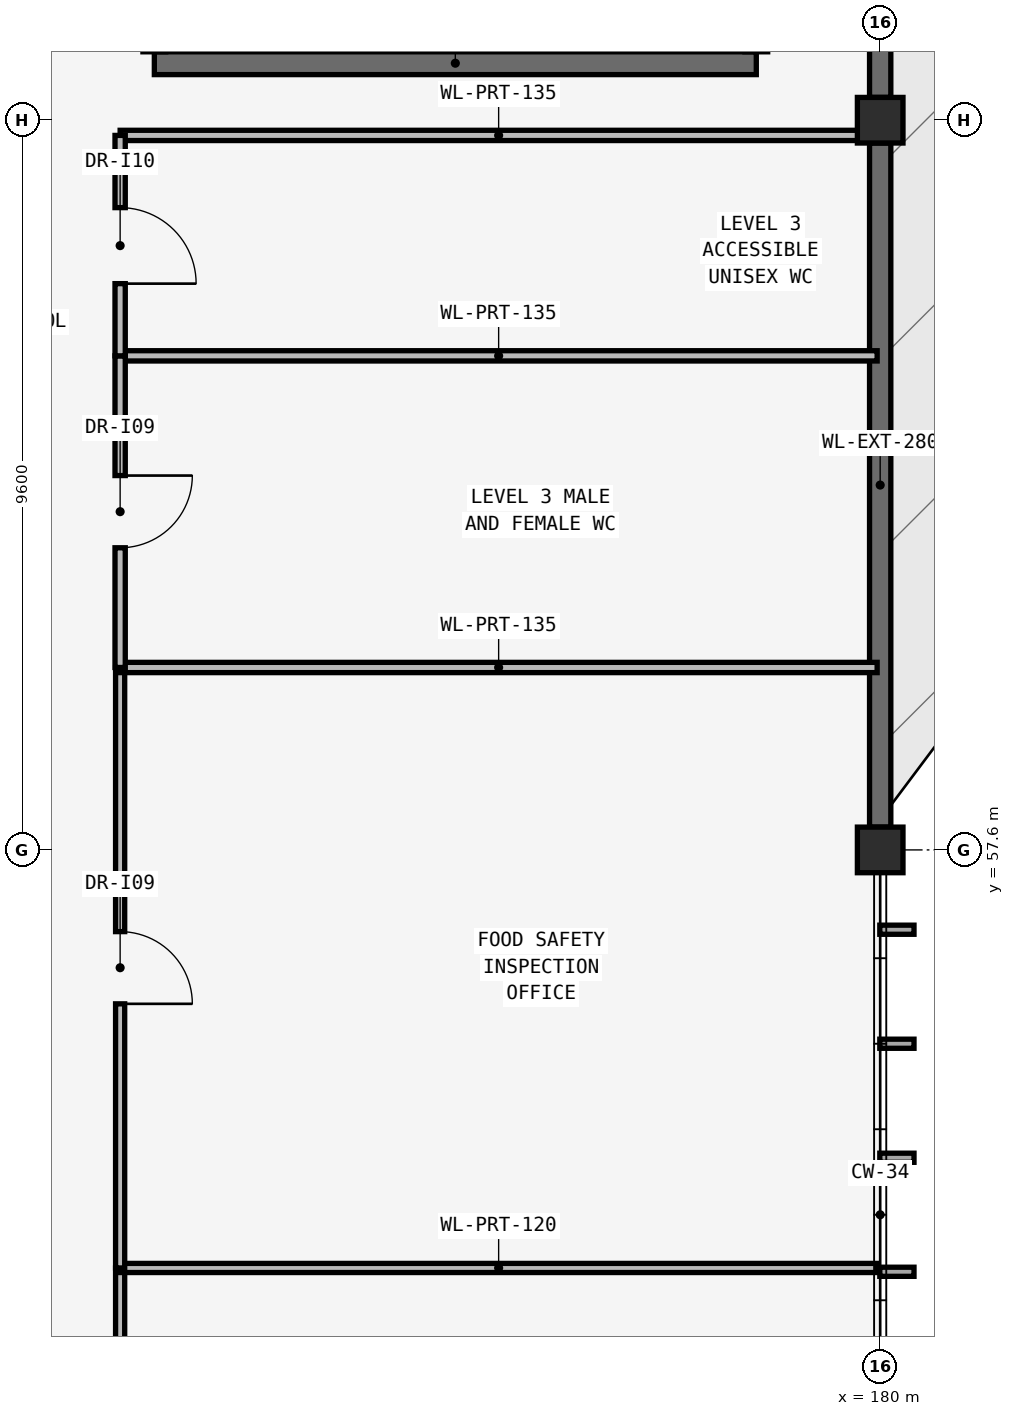
"""IFC4 building model, lengths in metres.
Left out: names, types, materials, properties, quantities, classifications, styles, units other than length and angle.
Written with IfcOpenShell. Run it as: python <this file> out.ifc"""

import sys

from ifc_helpers import new_model, si_unit, direction, frame, frame_2d, origin, origin_2d, place, context, subcontext, project, spatial, rectangle, extrude, element, fill, save


model = new_model("IFC4")
c1 = context("Model", 3, precision=1e-05, world=origin(), true_north=direction((0.0, 1.0)))
c2 = subcontext(c1, "Body", "Model", "MODEL_VIEW")
j1 = project(units=[si_unit("LENGTHUNIT", "METRE"), si_unit("PLANEANGLEUNIT", "RADIAN")], contexts=[c1])
p1 = place(None, origin())
s1 = spatial("IfcSite", under=j1, at=p1, CompositionType="ELEMENT")
p2 = place(p1, origin())
s2 = spatial("IfcBuilding", under=s1, at=p2, CompositionType="ELEMENT")
p3 = place(p2, frame((0.0, 0.0, 14.4)))
s3 = spatial("IfcBuildingStorey", under=s2, at=p3, CompositionType="ELEMENT", Elevation=14.4)
for number, where, z_axis, x_axis in (
    (1, (180.0, 57.6, 0.0), (0.0, 0.0, 1.0), (1.0, 0.0, 0.0)),
    (2, (180.0, 67.2, 0.0), (0.0, 0.0, 1.0), (1.0, 0.0, 0.0)),
):
    element("IfcColumn", number, at=place(p3, frame(where, z_axis=z_axis, x_axis=x_axis)), inside=s3, PredefinedType="COLUMN", context=c2, shape_type="SweptSolid", body=[
        extrude(rectangle(XDim=0.6, YDim=0.6, at=origin_2d()), origin(), (0.0, 0.0, 1.0), 4.2),
    ])
for number, where, z_axis, x_axis in (
    (3, (180.0, 57.9, 0.0), (0.0, 0.0, 1.0), (0.0, 1.0, 0.0)),
    (4, (180.0, 67.5, 0.0), (0.0, 0.0, 1.0), (0.0, 1.0, 0.0)),
):
    element("IfcWall", number, at=place(p3, frame(where, z_axis=z_axis, x_axis=x_axis)), inside=s3, PredefinedType="SOLIDWALL", context=c2, shape_type="SweptSolid", body=[
        extrude(rectangle(XDim=9.0, YDim=0.28, at=frame_2d((4.5, 0.0))), origin(), (0.0, 0.0, 1.0), 3.9),
    ])
p4 = place(p3, frame((170.45, 67.95, 0.0), z_axis=(0.0, 0.0, 1.0), x_axis=(1.0, 0.0, 0.0)))
e5 = element("IfcWall", 5, at=p4, inside=s3, PredefinedType="SHEAR", context=c2, shape_type="SweptSolid", body=[
    extrude(rectangle(XDim=7.92, YDim=0.3, at=frame_2d((3.96, 0.0))), origin(), (0.0, 0.0, 1.0), 3.95),
])
p5 = place(p3, frame((170.0, 38.65, 0.0), z_axis=(0.0, 0.0, 1.0), x_axis=(0.0, 1.0, 0.0)))
e6 = element("IfcWall", 6, at=p5, inside=s3, PredefinedType="PARTITIONING", context=c2, shape_type="SweptSolid", body=[
    extrude(rectangle(XDim=13.45, YDim=0.12, at=frame_2d((6.725, 0.0))), origin(), (0.0, 0.0, 1.0), 3.95),
])
p6 = place(p5, frame((6.25, 0.0, 0.0)))
e7 = element("IfcOpeningElement", 7, at=p6, cuts=e6, PredefinedType="OPENING", context=c2, shape_type="SweptSolid", body=[
    extrude(rectangle(XDim=0.95, YDim=2.1, at=frame_2d((0.475, 1.05))), frame((0.0, 0.075, 0.0), z_axis=(0.0, -1.0, 0.0), x_axis=(1.0, 0.0, 0.0)), (0.0, 0.0, 1.0), 0.15),
])
p7 = place(p3, frame((170.0, 52.1, 0.0), z_axis=(0.0, 0.0, 1.0), x_axis=(1.0, 0.0, 0.0)))
e8 = element("IfcWall", 8, at=p7, inside=s3, PredefinedType="PARTITIONING", context=c2, shape_type="SweptSolid", body=[
    extrude(rectangle(XDim=9.96, YDim=0.12, at=frame_2d((4.98, 0.0))), origin(), (0.0, 0.0, 1.0), 3.95),
])
p8 = place(p3, frame((170.0, 52.1, 0.0), z_axis=(0.0, 0.0, 1.0), x_axis=(0.0, 1.0, 0.0)))
e9 = element("IfcWall", 9, at=p8, inside=s3, PredefinedType="PARTITIONING", context=c2, shape_type="SweptSolid", body=[
    extrude(rectangle(XDim=7.9, YDim=0.12, at=frame_2d((3.95, 0.0))), origin(), (0.0, 0.0, 1.0), 3.95),
])
p9 = place(p8, frame((3.475, 0.0, 0.0)))
e10 = element("IfcOpeningElement", 10, at=p9, cuts=e9, PredefinedType="OPENING", context=c2, shape_type="SweptSolid", body=[
    extrude(rectangle(XDim=0.95, YDim=2.1, at=frame_2d((0.475, 1.05))), frame((0.0, 0.075, 0.0), z_axis=(0.0, -1.0, 0.0), x_axis=(1.0, 0.0, 0.0)), (0.0, 0.0, 1.0), 0.15),
])
for number, where, z_axis, x_axis in (
    (11, (170.0, 60.0, 0.0), (0.0, 0.0, 1.0), (1.0, 0.0, 0.0)),
    (12, (170.0, 64.1, 0.0), (0.0, 0.0, 1.0), (1.0, 0.0, 0.0)),
):
    element("IfcWall", number, at=place(p3, frame(where, z_axis=z_axis, x_axis=x_axis)), inside=s3, PredefinedType="PARTITIONING", context=c2, shape_type="SweptSolid", body=[
        extrude(rectangle(XDim=9.96, YDim=0.135, at=frame_2d((4.98, 0.0))), origin(), (0.0, 0.0, 1.0), 3.95),
    ])
p10 = place(p3, frame((170.0, 67.0, 0.0), z_axis=(0.0, 0.0, 1.0), x_axis=(1.0, 0.0, 0.0)))
e13 = element("IfcWall", 13, at=p10, inside=s3, PredefinedType="PARTITIONING", context=c2, shape_type="SweptSolid", body=[
    extrude(rectangle(XDim=9.96, YDim=0.135, at=frame_2d((4.98, 0.0))), origin(), (0.0, 0.0, 1.0), 3.498),
])
p11 = place(p3, frame((170.0, 60.0, 0.0), z_axis=(0.0, 0.0, 1.0), x_axis=(0.0, 1.0, 0.0)))
e14 = element("IfcWall", 14, at=p11, inside=s3, PredefinedType="PARTITIONING", context=c2, shape_type="SweptSolid", body=[
    extrude(rectangle(XDim=4.1, YDim=0.135, at=frame_2d((2.05, 0.0))), origin(), (0.0, 0.0, 1.0), 3.95),
])
p12 = place(p11, frame((1.575, 0.0, 0.0)))
e15 = element("IfcOpeningElement", 15, at=p12, cuts=e14, PredefinedType="OPENING", context=c2, shape_type="SweptSolid", body=[
    extrude(rectangle(XDim=0.95, YDim=2.1, at=frame_2d((0.475, 1.05))), frame((0.0, 0.083, 0.0), z_axis=(0.0, -1.0, 0.0), x_axis=(1.0, 0.0, 0.0)), (0.0, 0.0, 1.0), 0.165),
])
p13 = place(p3, frame((170.0, 64.1, 0.0), z_axis=(0.0, 0.0, 1.0), x_axis=(0.0, 1.0, 0.0)))
e16 = element("IfcWall", 16, at=p13, inside=s3, PredefinedType="PARTITIONING", context=c2, shape_type="SweptSolid", body=[
    extrude(rectangle(XDim=2.9, YDim=0.135, at=frame_2d((1.45, 0.0))), origin(), (0.0, 0.0, 1.0), 3.95),
])
p14 = place(p13, frame((0.95, 0.0, 0.0)))
e17 = element("IfcOpeningElement", 17, at=p14, cuts=e16, PredefinedType="OPENING", context=c2, shape_type="SweptSolid", body=[
    extrude(rectangle(XDim=1.0, YDim=2.1, at=frame_2d((0.5, 1.05))), frame((0.0, 0.083, 0.0), z_axis=(0.0, -1.0, 0.0), x_axis=(1.0, 0.0, 0.0)), (0.0, 0.0, 1.0), 0.165),
])
p15 = place(p9, origin())
e18 = element("IfcDoor", 18, at=p15, inside=s3, OperationType="SINGLE_SWING_LEFT", PredefinedType="DOOR", context=c2, shape_type="SweptSolid", body=[
    extrude(rectangle(XDim=0.95, YDim=2.1, at=frame_2d((0.475, 1.05))), frame((0.0, 0.025, 0.0), z_axis=(0.0, -1.0, 0.0), x_axis=(1.0, 0.0, 0.0)), (0.0, 0.0, 1.0), 0.05),
])
fill(e10, e18)
p16 = place(p12, origin())
e19 = element("IfcDoor", 19, at=p16, inside=s3, OperationType="SINGLE_SWING_RIGHT", PredefinedType="DOOR", context=c2, shape_type="SweptSolid", body=[
    extrude(rectangle(XDim=0.95, YDim=2.1, at=frame_2d((0.475, 1.05))), frame((0.0, 0.025, 0.0), z_axis=(0.0, -1.0, 0.0), x_axis=(1.0, 0.0, 0.0)), (0.0, 0.0, 1.0), 0.05),
])
fill(e15, e19)
p17 = place(p14, origin())
e20 = element("IfcDoor", 20, at=p17, inside=s3, OperationType="SINGLE_SWING_LEFT", PredefinedType="DOOR", context=c2, shape_type="SweptSolid", body=[
    extrude(rectangle(XDim=1.0, YDim=2.1, at=frame_2d((0.5, 1.05))), frame((0.0, 0.025, 0.0), z_axis=(0.0, -1.0, 0.0), x_axis=(1.0, 0.0, 0.0)), (0.0, 0.0, 1.0), 0.05),
])
fill(e17, e20)
save(model, sys.argv[1])
